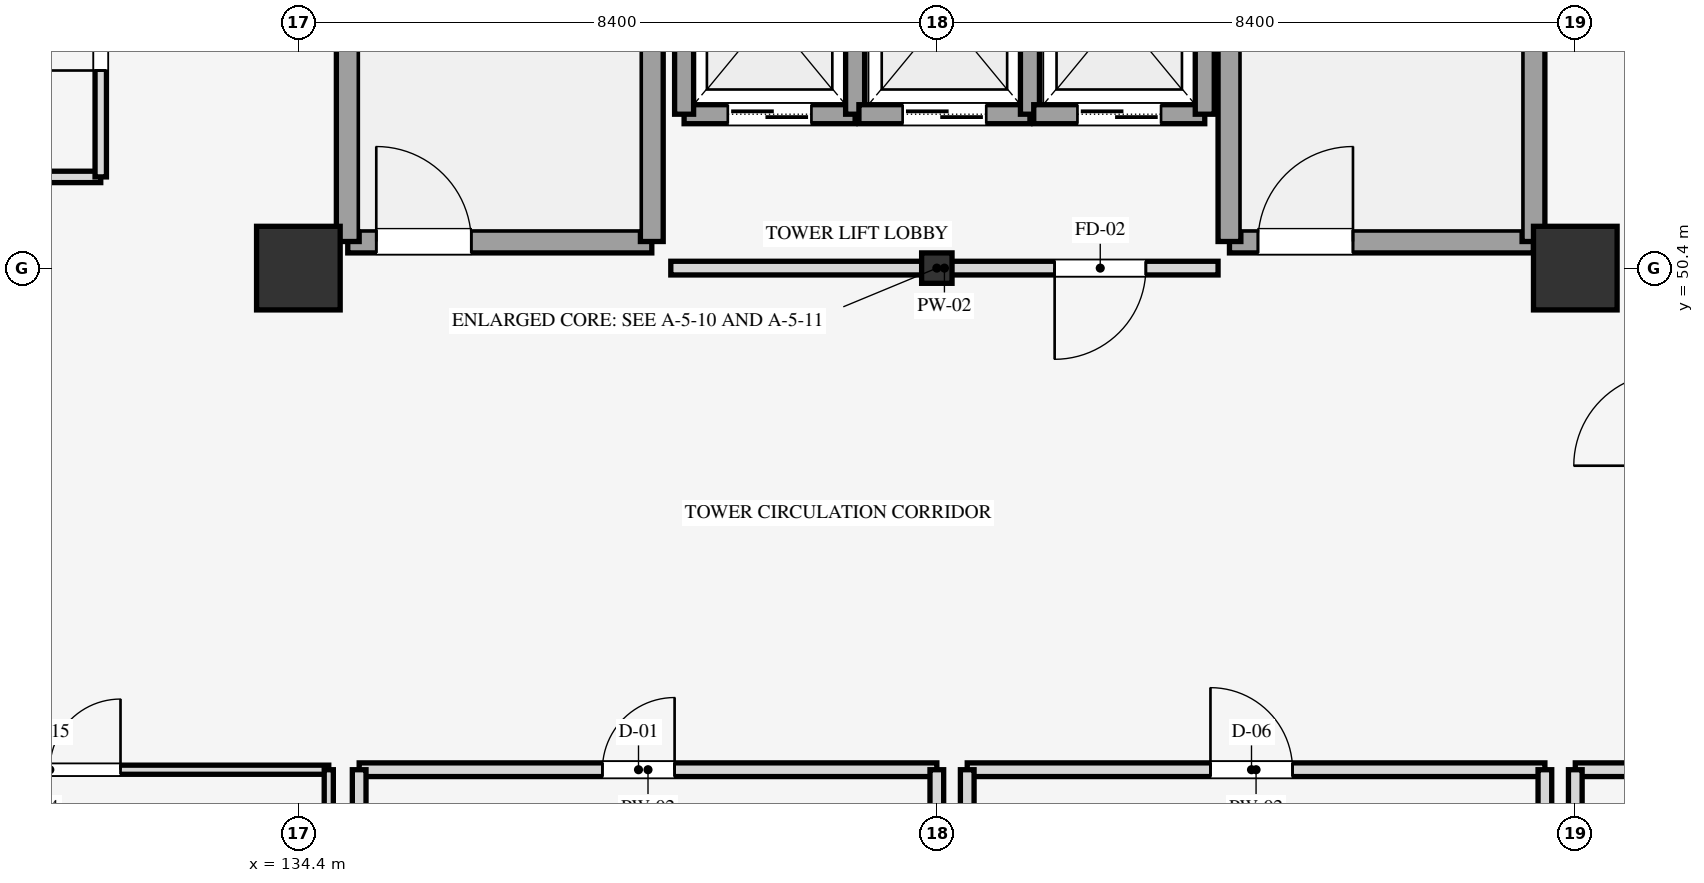
"""IFC4 building model, lengths in metres.
Left out: names, types, materials, properties, quantities, classifications, styles, units other than length and angle.
Written with IfcOpenShell. Run it as: python <this file> out.ifc"""

import sys

from ifc_helpers import new_model, si_unit, direction, frame, frame_2d, origin, origin_2d, place, context, subcontext, project, spatial, rectangle, i_section, extrude, element, fill, save


model = new_model("IFC4")
c1 = context("Model", 3, precision=1e-05, world=origin(), true_north=direction((0.0, 1.0)))
c2 = subcontext(c1, "Body", "Model", "MODEL_VIEW")
j1 = project(units=[si_unit("LENGTHUNIT", "METRE"), si_unit("PLANEANGLEUNIT", "RADIAN")], contexts=[c1])
p1 = place(None, origin())
s1 = spatial("IfcSite", under=j1, at=p1, CompositionType="ELEMENT")
p2 = place(p1, origin())
s2 = spatial("IfcBuilding", under=s1, at=p2, CompositionType="ELEMENT")
p3 = place(p2, frame((0.0, 0.0, 32.1)))
s3 = spatial("IfcBuildingStorey", under=s2, at=p3, CompositionType="ELEMENT", Elevation=32.1)
p4 = place(p3, frame((134.4, 50.4, 0.0), z_axis=(0.0, 0.0, 1.0), x_axis=(1.0, 0.0, 0.0)))
e1 = element("IfcColumn", 1, at=p4, inside=s3, PredefinedType="COLUMN", context=c2, shape_type="SweptSolid", body=[
    extrude(rectangle(XDim=1.1, YDim=1.1, at=origin_2d()), origin(), (0.0, 0.0, 1.0), 4.2),
])
p5 = place(p3, frame((142.8, 50.4, 0.0), z_axis=(0.0, 0.0, 1.0), x_axis=(1.0, 0.0, 0.0)))
e2 = element("IfcColumn", 2, at=p5, inside=s3, PredefinedType="COLUMN", context=c2, shape_type="SweptSolid", body=[
    extrude(i_section(OverallWidth=0.4, OverallDepth=0.4, WebThickness=0.013, FlangeThickness=0.021, FilletRadius=0.022, at=origin_2d()), origin(), (0.0, 0.0, 1.0), 4.2),
])
p6 = place(p3, frame((151.2, 50.4, 0.0), z_axis=(0.0, 0.0, 1.0), x_axis=(1.0, 0.0, 0.0)))
e3 = element("IfcColumn", 3, at=p6, inside=s3, PredefinedType="COLUMN", context=c2, shape_type="SweptSolid", body=[
    extrude(rectangle(XDim=1.1, YDim=1.1, at=origin_2d()), origin(), (0.0, 0.0, 1.0), 4.2),
])
p7 = place(p3, frame((135.05, 50.75, 0.0), z_axis=(0.0, 0.0, 1.0), x_axis=(1.0, 0.0, 0.0)))
e4 = element("IfcWall", 4, at=p7, inside=s3, PredefinedType="SHEAR", context=c2, shape_type="SweptSolid", body=[
    extrude(rectangle(XDim=4.0, YDim=0.3, at=frame_2d((2.0, 0.0))), origin(), (0.0, 0.0, 1.0), 4.2),
])
p8 = place(p7, frame((0.375, 0.0, 0.0)))
e5 = element("IfcOpeningElement", 5, at=p8, cuts=e4, PredefinedType="OPENING", context=c2, shape_type="SweptSolid", body=[
    extrude(rectangle(XDim=1.25, YDim=2.15, at=frame_2d((0.625, 1.075))), frame((0.0, 0.16, 0.0), z_axis=(0.0, -1.0, 0.0), x_axis=(1.0, 0.0, 0.0)), (0.0, 0.0, 1.0), 0.32),
])
for number, where, z_axis, x_axis in (
    (6, (135.05, 50.75, 0.0), (0.0, 0.0, 1.0), (0.0, 1.0, 0.0)),
    (7, (139.05, 50.75, 0.0), (0.0, 0.0, 1.0), (0.0, 1.0, 0.0)),
):
    element("IfcWall", number, at=place(p3, frame(where, z_axis=z_axis, x_axis=x_axis)), inside=s3, PredefinedType="SHEAR", context=c2, shape_type="SweptSolid", body=[
        extrude(rectangle(XDim=14.3, YDim=0.3, at=frame_2d((7.15, 0.0))), origin(), (0.0, 0.0, 1.0), 4.2),
    ])
p9 = place(p3, frame((137.25, 52.4, 0.0), z_axis=(0.0, 0.0, 1.0), x_axis=(0.0, 1.0, 0.0)))
e8 = element("IfcWall", 8, at=p9, inside=s3, PredefinedType="SHEAR", context=c2, shape_type="SweptSolid", body=[
    extrude(rectangle(XDim=11.0, YDim=0.2, at=frame_2d((5.5, 0.0))), origin(), (0.0, 0.0, 1.0), 4.2),
])
p10 = place(p3, frame((146.65, 50.75, 0.0), z_axis=(0.0, 0.0, 1.0), x_axis=(1.0, 0.0, 0.0)))
e9 = element("IfcWall", 9, at=p10, inside=s3, PredefinedType="SHEAR", context=c2, shape_type="SweptSolid", body=[
    extrude(rectangle(XDim=4.0, YDim=0.3, at=frame_2d((2.0, 0.0))), origin(), (0.0, 0.0, 1.0), 4.2),
])
p11 = place(p10, frame((0.375, 0.0, 0.0)))
e10 = element("IfcOpeningElement", 10, at=p11, cuts=e9, PredefinedType="OPENING", context=c2, shape_type="SweptSolid", body=[
    extrude(rectangle(XDim=1.25, YDim=2.15, at=frame_2d((0.625, 1.075))), frame((0.0, 0.16, 0.0), z_axis=(0.0, -1.0, 0.0), x_axis=(1.0, 0.0, 0.0)), (0.0, 0.0, 1.0), 0.32),
])
for number, where, z_axis, x_axis in (
    (11, (146.65, 50.75, 0.0), (0.0, 0.0, 1.0), (0.0, 1.0, 0.0)),
    (12, (150.65, 50.75, 0.0), (0.0, 0.0, 1.0), (0.0, 1.0, 0.0)),
):
    element("IfcWall", number, at=place(p3, frame(where, z_axis=z_axis, x_axis=x_axis)), inside=s3, PredefinedType="SHEAR", context=c2, shape_type="SweptSolid", body=[
        extrude(rectangle(XDim=14.3, YDim=0.3, at=frame_2d((7.15, 0.0))), origin(), (0.0, 0.0, 1.0), 4.2),
    ])
p12 = place(p3, frame((148.85, 52.4, 0.0), z_axis=(0.0, 0.0, 1.0), x_axis=(0.0, 1.0, 0.0)))
e13 = element("IfcWall", 13, at=p12, inside=s3, PredefinedType="SHEAR", context=c2, shape_type="SweptSolid", body=[
    extrude(rectangle(XDim=11.0, YDim=0.2, at=frame_2d((5.5, 0.0))), origin(), (0.0, 0.0, 1.0), 4.2),
])
p13 = place(p3, frame((139.475, 52.425, 0.0), z_axis=(0.0, 0.0, 1.0), x_axis=(1.0, 0.0, 0.0)))
e14 = element("IfcWall", 14, at=p13, inside=s3, PredefinedType="SHEAR", context=c2, shape_type="SweptSolid", body=[
    extrude(rectangle(XDim=2.25, YDim=0.25, at=frame_2d((1.125, 0.0))), origin(), (0.0, 0.0, 1.0), 3.96),
])
p14 = place(p13, frame((0.575, 0.0, 0.0)))
e15 = element("IfcOpeningElement", 15, at=p14, cuts=e14, PredefinedType="OPENING", context=c2, shape_type="SweptSolid", body=[
    extrude(rectangle(XDim=1.1, YDim=2.15, at=frame_2d((0.55, 1.075))), frame((0.0, 0.135, 0.0), z_axis=(0.0, -1.0, 0.0), x_axis=(1.0, 0.0, 0.0)), (0.0, 0.0, 1.0), 0.27),
])
for number, where, z_axis, x_axis in (
    (16, (139.475, 52.425, 0.0), (0.0, 0.0, 1.0), (0.0, 1.0, 0.0)),
    (17, (141.725, 52.425, 0.0), (0.0, 0.0, 1.0), (0.0, 1.0, 0.0)),
):
    element("IfcWall", number, at=place(p3, frame(where, z_axis=z_axis, x_axis=x_axis)), inside=s3, PredefinedType="SHEAR", context=c2, shape_type="SweptSolid", body=[
        extrude(rectangle(XDim=2.65, YDim=0.25, at=frame_2d((1.325, 0.0))), origin(), (0.0, 0.0, 1.0), 3.96),
    ])
p15 = place(p3, frame((141.775, 52.425, 0.0), z_axis=(0.0, 0.0, 1.0), x_axis=(1.0, 0.0, 0.0)))
e18 = element("IfcWall", 18, at=p15, inside=s3, PredefinedType="SHEAR", context=c2, shape_type="SweptSolid", body=[
    extrude(rectangle(XDim=2.25, YDim=0.25, at=frame_2d((1.125, 0.0))), origin(), (0.0, 0.0, 1.0), 3.96),
])
p16 = place(p15, frame((0.575, 0.0, 0.0)))
e19 = element("IfcOpeningElement", 19, at=p16, cuts=e18, PredefinedType="OPENING", context=c2, shape_type="SweptSolid", body=[
    extrude(rectangle(XDim=1.1, YDim=2.15, at=frame_2d((0.55, 1.075))), frame((0.0, 0.135, 0.0), z_axis=(0.0, -1.0, 0.0), x_axis=(1.0, 0.0, 0.0)), (0.0, 0.0, 1.0), 0.27),
])
p17 = place(p3, frame((144.025, 52.425, 0.0), z_axis=(0.0, 0.0, 1.0), x_axis=(0.0, 1.0, 0.0)))
e20 = element("IfcWall", 20, at=p17, inside=s3, PredefinedType="SHEAR", context=c2, shape_type="SweptSolid", body=[
    extrude(rectangle(XDim=2.65, YDim=0.25, at=frame_2d((1.325, 0.0))), origin(), (0.0, 0.0, 1.0), 3.96),
])
p18 = place(p3, frame((144.075, 52.425, 0.0), z_axis=(0.0, 0.0, 1.0), x_axis=(1.0, 0.0, 0.0)))
e21 = element("IfcWall", 21, at=p18, inside=s3, PredefinedType="SHEAR", context=c2, shape_type="SweptSolid", body=[
    extrude(rectangle(XDim=2.25, YDim=0.25, at=frame_2d((1.125, 0.0))), origin(), (0.0, 0.0, 1.0), 3.96),
])
p19 = place(p18, frame((0.575, 0.0, 0.0)))
e22 = element("IfcOpeningElement", 22, at=p19, cuts=e21, PredefinedType="OPENING", context=c2, shape_type="SweptSolid", body=[
    extrude(rectangle(XDim=1.1, YDim=2.15, at=frame_2d((0.55, 1.075))), frame((0.0, 0.135, 0.0), z_axis=(0.0, -1.0, 0.0), x_axis=(1.0, 0.0, 0.0)), (0.0, 0.0, 1.0), 0.27),
])
p20 = place(p3, frame((146.325, 52.425, 0.0), z_axis=(0.0, 0.0, 1.0), x_axis=(0.0, 1.0, 0.0)))
e23 = element("IfcWall", 23, at=p20, inside=s3, PredefinedType="SHEAR", context=c2, shape_type="SweptSolid", body=[
    extrude(rectangle(XDim=2.65, YDim=0.25, at=frame_2d((1.325, 0.0))), origin(), (0.0, 0.0, 1.0), 3.96),
])
p21 = place(p3, frame((139.3, 50.4, 0.0), z_axis=(0.0, 0.0, 1.0), x_axis=(1.0, 0.0, 0.0)))
e24 = element("IfcWall", 24, at=p21, inside=s3, PredefinedType="PARTITIONING", context=c2, shape_type="SweptSolid", body=[
    extrude(rectangle(XDim=7.2, YDim=0.18, at=frame_2d((3.6, 0.0))), origin(), (0.0, 0.0, 1.0), 3.24),
])
p22 = place(p21, frame((5.05, 0.0, 0.0)))
e25 = element("IfcOpeningElement", 25, at=p22, cuts=e24, PredefinedType="OPENING", context=c2, shape_type="SweptSolid", body=[
    extrude(rectangle(XDim=1.2, YDim=2.15, at=frame_2d((0.6, 1.075))), frame((0.0, 0.1, 0.0), z_axis=(0.0, -1.0, 0.0), x_axis=(1.0, 0.0, 0.0)), (0.0, 0.0, 1.0), 0.2),
])
p23 = place(p3, frame((127.75, 51.6, 0.0), z_axis=(0.0, 0.0, 1.0), x_axis=(1.0, 0.0, 0.0)))
e26 = element("IfcWall", 26, at=p23, inside=s3, PredefinedType="PARTITIONING", context=c2, shape_type="SweptSolid", body=[
    extrude(rectangle(XDim=4.05, YDim=0.15, at=frame_2d((2.025, 0.0))), origin(), (0.0, 0.0, 1.0), 3.24),
])
p24 = place(p3, frame((131.8, 51.6, 0.0), z_axis=(0.0, 0.0, 1.0), x_axis=(0.0, 1.0, 0.0)))
e27 = element("IfcWall", 27, at=p24, inside=s3, PredefinedType="PARTITIONING", context=c2, shape_type="SweptSolid", body=[
    extrude(rectangle(XDim=4.0, YDim=0.15, at=frame_2d((2.0, 0.0))), origin(), (0.0, 0.0, 1.0), 3.24),
])
p25 = place(p24, frame((1.4, 0.0, 0.0)))
e28 = element("IfcOpeningElement", 28, at=p25, cuts=e27, PredefinedType="OPENING", context=c2, shape_type="SweptSolid", body=[
    extrude(rectangle(XDim=1.28, YDim=2.16, at=frame_2d((0.64, 1.08))), frame((0.0, 0.085, 0.0), z_axis=(0.0, -1.0, 0.0), x_axis=(1.0, 0.0, 0.0)), (0.0, 0.0, 1.0), 0.17),
])
p26 = place(p3, frame((127.0, 43.8, 0.0), z_axis=(0.0, 0.0, 1.0), x_axis=(1.0, 0.0, 0.0)))
e29 = element("IfcWall", 29, at=p26, inside=s3, PredefinedType="PARTITIONING", context=c2, shape_type="SweptSolid", body=[
    extrude(rectangle(XDim=7.8, YDim=0.12, at=frame_2d((3.9, 0.0))), origin(), (0.0, 0.0, 1.0), 3.24),
])
p27 = place(p26, frame((3.2, 0.0, 0.0)))
e30 = element("IfcOpeningElement", 30, at=p27, cuts=e29, PredefinedType="OPENING", context=c2, shape_type="SweptSolid", body=[
    extrude(rectangle(XDim=1.86, YDim=2.26, at=frame_2d((0.93, 1.13))), frame((0.0, 0.07, 0.0), z_axis=(0.0, -1.0, 0.0), x_axis=(1.0, 0.0, 0.0)), (0.0, 0.0, 1.0), 0.14),
])
p28 = place(p3, frame((134.8, 34.4, 0.0), z_axis=(0.0, 0.0, 1.0), x_axis=(0.0, 1.0, 0.0)))
e31 = element("IfcWall", 31, at=p28, inside=s3, PredefinedType="PARTITIONING", context=c2, shape_type="SweptSolid", body=[
    extrude(rectangle(XDim=9.4, YDim=0.12, at=frame_2d((4.7, 0.0))), origin(), (0.0, 0.0, 1.0), 3.24),
])
p29 = place(p3, frame((135.2, 43.8, 0.0), z_axis=(0.0, 0.0, 1.0), x_axis=(1.0, 0.0, 0.0)))
e32 = element("IfcWall", 32, at=p29, inside=s3, PredefinedType="PARTITIONING", context=c2, shape_type="SweptSolid", body=[
    extrude(rectangle(XDim=7.6, YDim=0.18, at=frame_2d((3.8, 0.0))), origin(), (0.0, 0.0, 1.0), 3.24),
])
p30 = place(p29, frame((3.2, 0.0, 0.0)))
e33 = element("IfcOpeningElement", 33, at=p30, cuts=e32, PredefinedType="OPENING", context=c2, shape_type="SweptSolid", body=[
    extrude(rectangle(XDim=0.95, YDim=2.1, at=frame_2d((0.475, 1.05))), frame((0.0, 0.1, 0.0), z_axis=(0.0, -1.0, 0.0), x_axis=(1.0, 0.0, 0.0)), (0.0, 0.0, 1.0), 0.2),
])
for number, where, z_axis, x_axis in (
    (34, (135.2, 34.4, 0.0), (0.0, 0.0, 1.0), (0.0, 1.0, 0.0)),
    (35, (142.8, 34.4, 0.0), (0.0, 0.0, 1.0), (0.0, 1.0, 0.0)),
):
    element("IfcWall", number, at=place(p3, frame(where, z_axis=z_axis, x_axis=x_axis)), inside=s3, PredefinedType="PARTITIONING", context=c2, shape_type="SweptSolid", body=[
        extrude(rectangle(XDim=9.4, YDim=0.18, at=frame_2d((4.7, 0.0))), origin(), (0.0, 0.0, 1.0), 3.24),
    ])
p31 = place(p3, frame((143.2, 43.8, 0.0), z_axis=(0.0, 0.0, 1.0), x_axis=(1.0, 0.0, 0.0)))
e36 = element("IfcWall", 36, at=p31, inside=s3, PredefinedType="PARTITIONING", context=c2, shape_type="SweptSolid", body=[
    extrude(rectangle(XDim=7.6, YDim=0.18, at=frame_2d((3.8, 0.0))), origin(), (0.0, 0.0, 1.0), 3.24),
])
p32 = place(p31, frame((3.2, 0.0, 0.0)))
e37 = element("IfcOpeningElement", 37, at=p32, cuts=e36, PredefinedType="OPENING", context=c2, shape_type="SweptSolid", body=[
    extrude(rectangle(XDim=1.08, YDim=2.12, at=frame_2d((0.54, 1.06))), frame((0.0, 0.1, 0.0), z_axis=(0.0, -1.0, 0.0), x_axis=(1.0, 0.0, 0.0)), (0.0, 0.0, 1.0), 0.2),
])
for number, where, z_axis, x_axis in (
    (38, (143.2, 34.4, 0.0), (0.0, 0.0, 1.0), (0.0, 1.0, 0.0)),
    (39, (150.8, 34.4, 0.0), (0.0, 0.0, 1.0), (0.0, 1.0, 0.0)),
):
    element("IfcWall", number, at=place(p3, frame(where, z_axis=z_axis, x_axis=x_axis)), inside=s3, PredefinedType="PARTITIONING", context=c2, shape_type="SweptSolid", body=[
        extrude(rectangle(XDim=9.4, YDim=0.18, at=frame_2d((4.7, 0.0))), origin(), (0.0, 0.0, 1.0), 3.24),
    ])
p33 = place(p3, frame((151.2, 43.8, 0.0), z_axis=(0.0, 0.0, 1.0), x_axis=(1.0, 0.0, 0.0)))
e40 = element("IfcWall", 40, at=p33, inside=s3, PredefinedType="PARTITIONING", context=c2, shape_type="SweptSolid", body=[
    extrude(rectangle(XDim=7.8, YDim=0.18, at=frame_2d((3.9, 0.0))), origin(), (0.0, 0.0, 1.0), 3.24),
])
p34 = place(p33, frame((3.2, 0.0, 0.0)))
e41 = element("IfcOpeningElement", 41, at=p34, cuts=e40, PredefinedType="OPENING", context=c2, shape_type="SweptSolid", body=[
    extrude(rectangle(XDim=0.95, YDim=2.1, at=frame_2d((0.475, 1.05))), frame((0.0, 0.1, 0.0), z_axis=(0.0, -1.0, 0.0), x_axis=(1.0, 0.0, 0.0)), (0.0, 0.0, 1.0), 0.2),
])
p35 = place(p3, frame((151.2, 34.4, 0.0), z_axis=(0.0, 0.0, 1.0), x_axis=(0.0, 1.0, 0.0)))
e42 = element("IfcWall", 42, at=p35, inside=s3, PredefinedType="PARTITIONING", context=c2, shape_type="SweptSolid", body=[
    extrude(rectangle(XDim=9.4, YDim=0.18, at=frame_2d((4.7, 0.0))), origin(), (0.0, 0.0, 1.0), 3.24),
])
p36 = place(p8, origin())
e43 = element("IfcDoor", 43, at=p36, inside=s3, OperationType="SINGLE_SWING_LEFT", PredefinedType="DOOR", context=c2, shape_type="SweptSolid", body=[
    extrude(rectangle(XDim=1.25, YDim=2.15, at=frame_2d((0.625, 1.075))), frame((0.0, 0.025, 0.0), z_axis=(0.0, -1.0, 0.0), x_axis=(1.0, 0.0, 0.0)), (0.0, 0.0, 1.0), 0.05),
])
fill(e5, e43)
p37 = place(p11, origin())
e44 = element("IfcDoor", 44, at=p37, inside=s3, OperationType="SINGLE_SWING_RIGHT", PredefinedType="DOOR", context=c2, shape_type="SweptSolid", body=[
    extrude(rectangle(XDim=1.25, YDim=2.15, at=frame_2d((0.625, 1.075))), frame((0.0, 0.025, 0.0), z_axis=(0.0, -1.0, 0.0), x_axis=(1.0, 0.0, 0.0)), (0.0, 0.0, 1.0), 0.05),
])
fill(e10, e44)
p38 = place(p14, origin())
e45 = element("IfcDoor", 45, at=p38, inside=s3, OperationType="DOUBLE_DOOR_SLIDING", PredefinedType="DOOR", context=c2, shape_type="SweptSolid", body=[
    extrude(rectangle(XDim=1.1, YDim=2.15, at=frame_2d((0.55, 1.075))), frame((0.0, 0.025, 0.0), z_axis=(0.0, -1.0, 0.0), x_axis=(1.0, 0.0, 0.0)), (0.0, 0.0, 1.0), 0.05),
])
fill(e15, e45)
p39 = place(p16, origin())
e46 = element("IfcDoor", 46, at=p39, inside=s3, OperationType="DOUBLE_DOOR_SLIDING", PredefinedType="DOOR", context=c2, shape_type="SweptSolid", body=[
    extrude(rectangle(XDim=1.1, YDim=2.15, at=frame_2d((0.55, 1.075))), frame((0.0, 0.025, 0.0), z_axis=(0.0, -1.0, 0.0), x_axis=(1.0, 0.0, 0.0)), (0.0, 0.0, 1.0), 0.05),
])
fill(e19, e46)
p40 = place(p19, origin())
e47 = element("IfcDoor", 47, at=p40, inside=s3, OperationType="DOUBLE_DOOR_SLIDING", PredefinedType="DOOR", context=c2, shape_type="SweptSolid", body=[
    extrude(rectangle(XDim=1.1, YDim=2.15, at=frame_2d((0.55, 1.075))), frame((0.0, 0.025, 0.0), z_axis=(0.0, -1.0, 0.0), x_axis=(1.0, 0.0, 0.0)), (0.0, 0.0, 1.0), 0.05),
])
fill(e22, e47)
p41 = place(p22, frame((1.2, 0.0, 0.0), z_axis=(0.0, 0.0, 1.0), x_axis=(-1.0, 0.0, 0.0)))
e48 = element("IfcDoor", 48, at=p41, inside=s3, OperationType="SINGLE_SWING_RIGHT", PredefinedType="DOOR", context=c2, shape_type="SweptSolid", body=[
    extrude(rectangle(XDim=1.2, YDim=2.15, at=frame_2d((0.6, 1.075))), frame((0.0, 0.025, 0.0), z_axis=(0.0, -1.0, 0.0), x_axis=(1.0, 0.0, 0.0)), (0.0, 0.0, 1.0), 0.05),
])
fill(e25, e48)
p42 = place(p25, origin())
e49 = element("IfcDoor", 49, at=p42, inside=s3, OperationType="SINGLE_SWING_LEFT", PredefinedType="DOOR", context=c2, shape_type="SweptSolid", body=[
    extrude(rectangle(XDim=1.28, YDim=2.16, at=frame_2d((0.64, 1.08))), frame((0.0, 0.025, 0.0), z_axis=(0.0, -1.0, 0.0), x_axis=(1.0, 0.0, 0.0)), (0.0, 0.0, 1.0), 0.05),
])
fill(e28, e49)
p43 = place(p27, origin())
e50 = element("IfcDoor", 50, at=p43, inside=s3, OperationType="DOUBLE_DOOR_SINGLE_SWING", PredefinedType="DOOR", context=c2, shape_type="SweptSolid", body=[
    extrude(rectangle(XDim=1.86, YDim=2.26, at=frame_2d((0.93, 1.13))), frame((0.0, 0.025, 0.0), z_axis=(0.0, -1.0, 0.0), x_axis=(1.0, 0.0, 0.0)), (0.0, 0.0, 1.0), 0.05),
])
fill(e30, e50)
p44 = place(p30, origin())
e51 = element("IfcDoor", 51, at=p44, inside=s3, OperationType="SINGLE_SWING_RIGHT", PredefinedType="DOOR", context=c2, shape_type="SweptSolid", body=[
    extrude(rectangle(XDim=0.95, YDim=2.1, at=frame_2d((0.475, 1.05))), frame((0.0, 0.025, 0.0), z_axis=(0.0, -1.0, 0.0), x_axis=(1.0, 0.0, 0.0)), (0.0, 0.0, 1.0), 0.05),
])
fill(e33, e51)
p45 = place(p32, origin())
e52 = element("IfcDoor", 52, at=p45, inside=s3, OperationType="SINGLE_SWING_LEFT", PredefinedType="DOOR", context=c2, shape_type="SweptSolid", body=[
    extrude(rectangle(XDim=1.08, YDim=2.12, at=frame_2d((0.54, 1.06))), frame((0.0, 0.025, 0.0), z_axis=(0.0, -1.0, 0.0), x_axis=(1.0, 0.0, 0.0)), (0.0, 0.0, 1.0), 0.05),
])
fill(e37, e52)
save(model, sys.argv[1])
